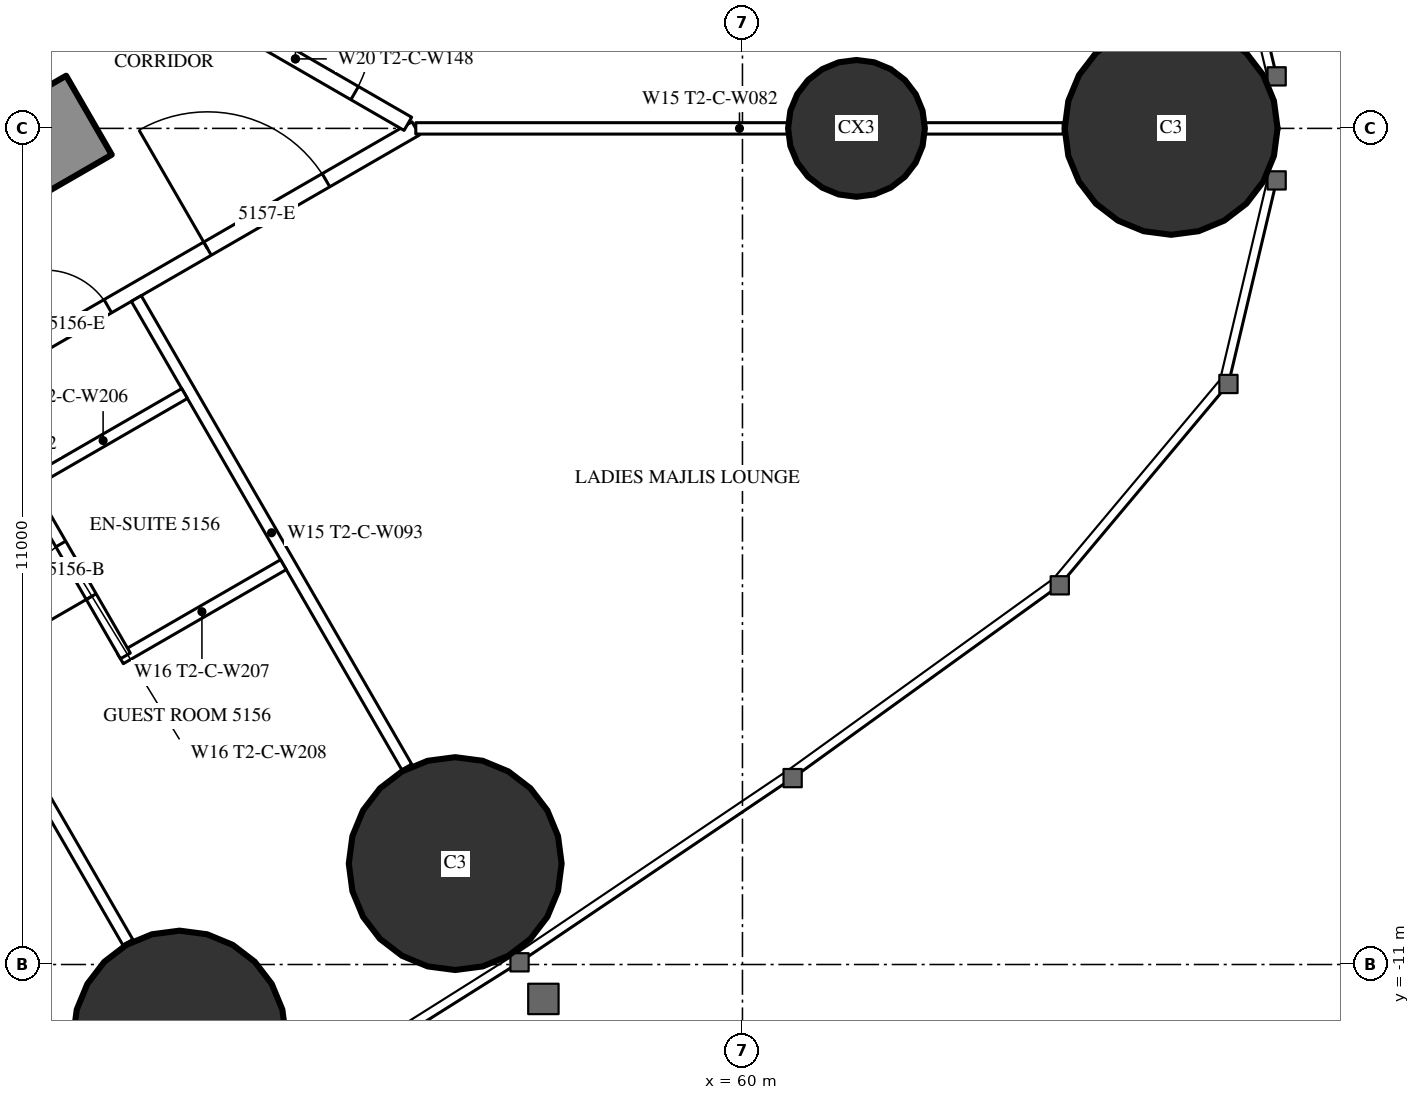
"""IFC4 building model, lengths in metres.
Left out: names, types, materials, properties, quantities, classifications, styles, units other than length and angle.
Written with IfcOpenShell. Run it as: python <this file> out.ifc"""

import sys

from ifc_helpers import new_model, si_unit, direction, frame, frame_2d, origin, origin_2d, place, context, subcontext, project, spatial, rectangle, circle, extrude, element, fill, save


model = new_model("IFC4")
c1 = context("Model", 3, precision=1e-05, world=origin(), true_north=direction((0.0, 1.0)))
c2 = subcontext(c1, "Body", "Model", "MODEL_VIEW")
j1 = project(units=[si_unit("LENGTHUNIT", "METRE"), si_unit("PLANEANGLEUNIT", "RADIAN")], contexts=[c1])
p1 = place(None, origin())
s1 = spatial("IfcSite", under=j1, at=p1, CompositionType="ELEMENT")
p2 = place(p1, origin())
s2 = spatial("IfcBuilding", under=s1, at=p2, CompositionType="ELEMENT")
p3 = place(p2, frame((0.0, 0.0, 191.3)))
s3 = spatial("IfcBuildingStorey", under=s2, at=p3, CompositionType="ELEMENT", Elevation=191.3)
for number, where, z_axis, x_axis in (
    (1, (65.64, 0.0, 0.0), (0.0, 0.0, 1.0), (1.0, 0.0, 0.0)),
    (2, (52.594, -11.955, 0.0), (0.0, 0.0, 1.0), (1.0, 0.0, 0.0)),
    (3, (56.221, -9.672, 0.0), (0.0, 0.0, 1.0), (1.0, 0.0, 0.0)),
):
    element("IfcColumn", number, at=place(p3, frame(where, z_axis=z_axis, x_axis=x_axis)), inside=s3, PredefinedType="COLUMN", context=c2, shape_type="SweptSolid", body=[
        extrude(circle(Radius=1.4, at=origin_2d()), origin(), (0.0, 0.0, 1.0), 3.5),
    ])
p4 = place(p3, frame((61.5, 0.0, 0.0), z_axis=(0.0, 0.0, 1.0), x_axis=(1.0, 0.0, 0.0)))
e4 = element("IfcColumn", 4, at=p4, inside=s3, PredefinedType="COLUMN", context=c2, shape_type="SweptSolid", body=[
    extrude(circle(Radius=0.9, at=origin_2d()), origin(), (0.0, 0.0, 1.0), 3.5),
])
p5 = place(p3, frame((27.2, -13.8, 0.0), z_axis=(0.0, 0.0, 1.0), x_axis=(0.866027159892, 0.499996958321, 0.0)))
e5 = element("IfcWall", 5, at=p5, inside=s3, PredefinedType="SHEAR", context=c2, shape_type="SweptSolid", body=[
    extrude(rectangle(XDim=27.947, YDim=1.2, at=frame_2d((13.973, 0.0))), origin(), (0.0, 0.0, 1.0), 3.5),
])
p6 = place(p5, frame((4.6, 0.0, 0.0)))
e6 = element("IfcOpeningElement", 6, at=p6, cuts=e5, PredefinedType="OPENING", context=c2, shape_type="SweptSolid", body=[
    extrude(rectangle(XDim=1.0, YDim=2.2, at=frame_2d((0.5, 1.1))), frame((0.0, 0.61, 0.0), z_axis=(0.0, -1.0, 0.0), x_axis=(1.0, 0.0, 0.0)), (0.0, 0.0, 1.0), 1.22),
])
p7 = place(p5, frame((13.395, 0.0, 0.0)))
e7 = element("IfcOpeningElement", 7, at=p7, cuts=e5, PredefinedType="OPENING", context=c2, shape_type="SweptSolid", body=[
    extrude(rectangle(XDim=1.8, YDim=2.2, at=frame_2d((0.9, 1.1))), frame((0.0, 0.61, 0.0), z_axis=(0.0, -1.0, 0.0), x_axis=(1.0, 0.0, 0.0)), (0.0, 0.0, 1.0), 1.22),
])
p8 = place(p3, frame((27.959, -16.017, 0.0), z_axis=(0.0, 0.0, 1.0), x_axis=(0.866024151371, 0.500002169237, 0.0)))
e8 = element("IfcWall", 8, at=p8, inside=s3, PredefinedType="PARTITIONING", context=c2, shape_type="SweptSolid", body=[
    extrude(rectangle(XDim=32.034, YDim=0.2, at=frame_2d((16.017, 0.0))), origin(), (0.0, 0.0, 1.0), 3.25),
])
p9 = place(p8, frame((0.6, 0.0, 0.0)))
e9 = element("IfcOpeningElement", 9, at=p9, cuts=e8, PredefinedType="OPENING", context=c2, shape_type="SweptSolid", body=[
    extrude(rectangle(XDim=0.95, YDim=2.2, at=frame_2d((0.475, 1.1))), frame((0.0, 0.11, 0.0), z_axis=(0.0, -1.0, 0.0), x_axis=(1.0, 0.0, 0.0)), (0.0, 0.0, 1.0), 0.22),
])
p10 = place(p8, frame((13.132, 0.0, 0.0)))
e10 = element("IfcOpeningElement", 10, at=p10, cuts=e8, PredefinedType="OPENING", context=c2, shape_type="SweptSolid", body=[
    extrude(rectangle(XDim=0.95, YDim=2.2, at=frame_2d((0.475, 1.1))), frame((0.0, 0.11, 0.0), z_axis=(0.0, -1.0, 0.0), x_axis=(1.0, 0.0, 0.0)), (0.0, 0.0, 1.0), 0.22),
])
p11 = place(p8, frame((15.391, 0.0, 0.0)))
e11 = element("IfcOpeningElement", 11, at=p11, cuts=e8, PredefinedType="OPENING", context=c2, shape_type="SweptSolid", body=[
    extrude(rectangle(XDim=0.95, YDim=2.2, at=frame_2d((0.475, 1.1))), frame((0.0, 0.11, 0.0), z_axis=(0.0, -1.0, 0.0), x_axis=(1.0, 0.0, 0.0)), (0.0, 0.0, 1.0), 0.22),
])
p12 = place(p8, frame((19.441, 0.0, 0.0)))
e12 = element("IfcOpeningElement", 12, at=p12, cuts=e8, PredefinedType="OPENING", context=c2, shape_type="SweptSolid", body=[
    extrude(rectangle(XDim=0.95, YDim=2.2, at=frame_2d((0.475, 1.1))), frame((0.0, 0.11, 0.0), z_axis=(0.0, -1.0, 0.0), x_axis=(1.0, 0.0, 0.0)), (0.0, 0.0, 1.0), 0.22),
])
p13 = place(p8, frame((26.406, 0.0, 0.0)))
e13 = element("IfcOpeningElement", 13, at=p13, cuts=e8, PredefinedType="OPENING", context=c2, shape_type="SweptSolid", body=[
    extrude(rectangle(XDim=0.95, YDim=2.2, at=frame_2d((0.475, 1.1))), frame((0.0, 0.11, 0.0), z_axis=(0.0, -1.0, 0.0), x_axis=(1.0, 0.0, 0.0)), (0.0, 0.0, 1.0), 0.22),
])
p14 = place(p8, frame((28.87, 0.0, 0.0)))
e14 = element("IfcOpeningElement", 14, at=p14, cuts=e8, PredefinedType="OPENING", context=c2, shape_type="SweptSolid", body=[
    extrude(rectangle(XDim=1.8, YDim=2.2, at=frame_2d((0.9, 1.1))), frame((0.0, 0.11, 0.0), z_axis=(0.0, -1.0, 0.0), x_axis=(1.0, 0.0, 0.0)), (0.0, 0.0, 1.0), 0.22),
])
p15 = place(p3, frame((48.275, -4.404, 0.0), z_axis=(0.0, 0.0, 1.0), x_axis=(0.500006004368, -0.866021937133, 0.0)))
e15 = element("IfcWall", 15, at=p15, inside=s3, PredefinedType="PARTITIONING", context=c2, shape_type="SweptSolid", body=[
    extrude(rectangle(XDim=7.279, YDim=0.15, at=frame_2d((3.64, 0.0))), origin(), (0.0, 0.0, 1.0), 2.3),
])
p16 = place(p3, frame((52.025, -2.238, 0.0), z_axis=(0.0, 0.0, 1.0), x_axis=(0.499983785035, -0.866034765296, 0.0)))
e16 = element("IfcWall", 16, at=p16, inside=s3, PredefinedType="PARTITIONING", context=c2, shape_type="SweptSolid", body=[
    extrude(rectangle(XDim=7.116, YDim=0.15, at=frame_2d((3.558, 0.0))), origin(), (0.0, 0.0, 1.0), 2.3),
])
p17 = place(p3, frame((55.702, 0.0, 0.0), z_axis=(0.0, 0.0, 1.0), x_axis=(1.0, 0.0, 0.0)))
e17 = element("IfcWall", 17, at=p17, inside=s3, PredefinedType="PARTITIONING", context=c2, shape_type="SweptSolid", body=[
    extrude(rectangle(XDim=8.518, YDim=0.15, at=frame_2d((4.259, 0.0))), origin(), (0.0, 0.0, 1.0), 2.3),
])
p18 = place(p3, frame((52.639, 1.769, 0.0), z_axis=(0.0, 0.0, 1.0), x_axis=(0.866027340901, -0.4999966448, 0.0)))
e18 = element("IfcWall", 18, at=p18, inside=s3, PredefinedType="PARTITIONING", context=c2, shape_type="SweptSolid", body=[
    extrude(rectangle(XDim=3.417, YDim=0.2, at=frame_2d((1.708, 0.0))), origin(), (0.0, 0.0, 1.0), 3.25),
])
p19 = place(p18, frame((0.809, 0.0, 0.0)))
e19 = element("IfcOpeningElement", 19, at=p19, cuts=e18, PredefinedType="OPENING", context=c2, shape_type="SweptSolid", body=[
    extrude(rectangle(XDim=1.8, YDim=2.2, at=frame_2d((0.9, 1.1))), frame((0.0, 0.11, 0.0), z_axis=(0.0, -1.0, 0.0), x_axis=(1.0, 0.0, 0.0)), (0.0, 0.0, 1.0), 0.22),
])
p20 = place(p3, frame((51.817, -6.978, 0.0), z_axis=(0.0, 0.0, 1.0), x_axis=(0.866006523861, 0.500032699561, 0.0)))
e20 = element("IfcWall", 20, at=p20, inside=s3, PredefinedType="PARTITIONING", context=c2, shape_type="SweptSolid", body=[
    extrude(rectangle(XDim=2.475, YDim=0.15, at=frame_2d((1.237, 0.0))), origin(), (0.0, 0.0, 1.0), 3.25),
])
p21 = place(p3, frame((50.582, -4.688, 0.0), z_axis=(0.0, 0.0, 1.0), x_axis=(0.500006934395, -0.866021400173, 0.0)))
e21 = element("IfcWall", 21, at=p21, inside=s3, PredefinedType="PARTITIONING", context=c2, shape_type="SweptSolid", body=[
    extrude(rectangle(XDim=2.6, YDim=0.15, at=frame_2d((1.3, 0.0))), origin(), (0.0, 0.0, 1.0), 3.25),
])
p22 = place(p21, frame((0.9, 0.0, 0.0)))
e22 = element("IfcOpeningElement", 22, at=p22, cuts=e21, PredefinedType="OPENING", context=c2, shape_type="SweptSolid", body=[
    extrude(rectangle(XDim=0.8, YDim=2.2, at=frame_2d((0.4, 1.1))), frame((0.0, 0.085, 0.0), z_axis=(0.0, -1.0, 0.0), x_axis=(1.0, 0.0, 0.0)), (0.0, 0.0, 1.0), 0.17),
])
p23 = place(p3, frame((50.517, -4.726, 0.0), z_axis=(0.0, 0.0, 1.0), x_axis=(0.866031185235, 0.4999899861, 0.0)))
e23 = element("IfcWall", 23, at=p23, inside=s3, PredefinedType="PARTITIONING", context=c2, shape_type="SweptSolid", body=[
    extrude(rectangle(XDim=2.475, YDim=0.15, at=frame_2d((1.238, 0.0))), origin(), (0.0, 0.0, 1.0), 3.25),
])
p24 = place(p22, origin())
e24 = element("IfcDoor", 24, at=p24, inside=s3, OperationType="SINGLE_SWING_RIGHT", PredefinedType="DOOR", context=c2, shape_type="SweptSolid", body=[
    extrude(rectangle(XDim=0.8, YDim=2.2, at=frame_2d((0.4, 1.1))), frame((0.0, 0.025, 0.0), z_axis=(0.0, -1.0, 0.0), x_axis=(1.0, 0.0, 0.0)), (0.0, 0.0, 1.0), 0.05),
])
fill(e22, e24)
p25 = place(p13, origin())
e25 = element("IfcDoor", 25, at=p25, inside=s3, OperationType="SINGLE_SWING_LEFT", PredefinedType="DOOR", context=c2, shape_type="SweptSolid", body=[
    extrude(rectangle(XDim=0.95, YDim=2.2, at=frame_2d((0.475, 1.1))), frame((0.0, 0.025, 0.0), z_axis=(0.0, -1.0, 0.0), x_axis=(1.0, 0.0, 0.0)), (0.0, 0.0, 1.0), 0.05),
])
fill(e13, e25)
p26 = place(p14, origin())
e26 = element("IfcDoor", 26, at=p26, inside=s3, OperationType="DOUBLE_DOOR_SINGLE_SWING", PredefinedType="DOOR", context=c2, shape_type="SweptSolid", body=[
    extrude(rectangle(XDim=1.8, YDim=2.2, at=frame_2d((0.9, 1.1))), frame((0.0, 0.025, 0.0), z_axis=(0.0, -1.0, 0.0), x_axis=(1.0, 0.0, 0.0)), (0.0, 0.0, 1.0), 0.05),
])
fill(e14, e26)
p27 = place(p19, origin())
e27 = element("IfcDoor", 27, at=p27, inside=s3, OperationType="DOUBLE_DOOR_SINGLE_SWING", PredefinedType="DOOR", context=c2, shape_type="SweptSolid", body=[
    extrude(rectangle(XDim=1.8, YDim=2.2, at=frame_2d((0.9, 1.1))), frame((0.0, 0.025, 0.0), z_axis=(0.0, -1.0, 0.0), x_axis=(1.0, 0.0, 0.0)), (0.0, 0.0, 1.0), 0.05),
])
fill(e19, e27)
save(model, sys.argv[1])
